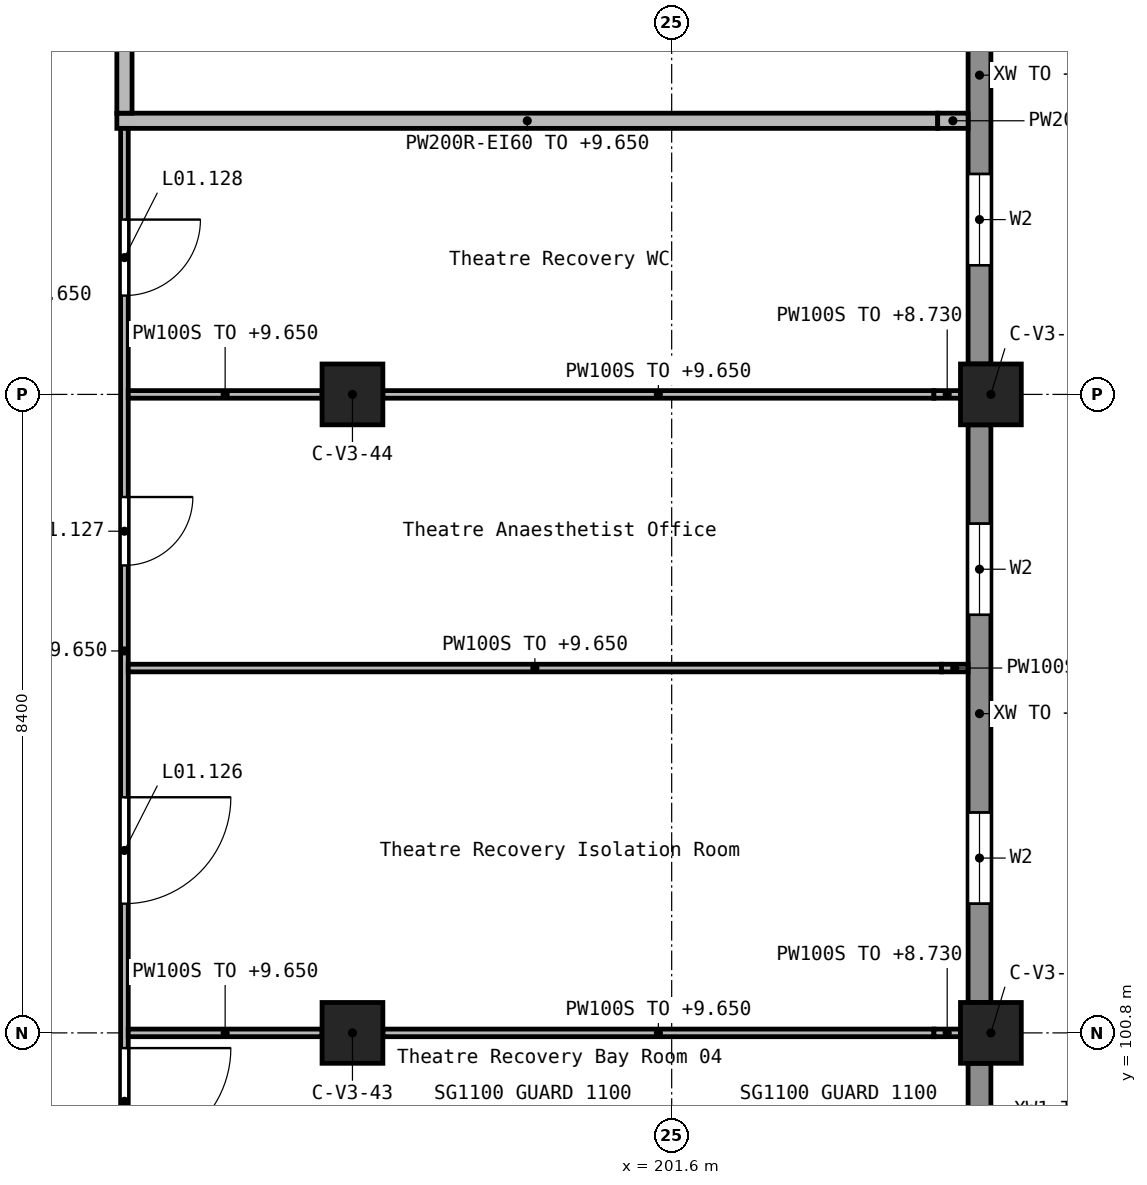
"""IFC4 building model, lengths in metres.
Left out: names, types, materials, properties, quantities, classifications, styles, units other than length and angle.
Written with IfcOpenShell. Run it as: python <this file> out.ifc"""

import sys

from ifc_helpers import new_model, si_unit, direction, frame, frame_2d, origin, origin_2d, place, context, subcontext, project, spatial, rectangle, extrude, element, fill, save


model = new_model("IFC4")
c1 = context("Model", 3, precision=1e-05, world=origin(), true_north=direction((0.0, 1.0)))
c2 = subcontext(c1, "Body", "Model", "MODEL_VIEW")
j1 = project(units=[si_unit("LENGTHUNIT", "METRE"), si_unit("PLANEANGLEUNIT", "RADIAN")], contexts=[c1])
p1 = place(None, origin())
s1 = spatial("IfcSite", under=j1, at=p1, CompositionType="ELEMENT")
p2 = place(p1, origin())
s2 = spatial("IfcBuilding", under=s1, at=p2, CompositionType="ELEMENT")
p3 = place(p2, frame((0.0, 0.0, 5.4)))
s3 = spatial("IfcBuildingStorey", under=s2, at=p3, CompositionType="ELEMENT", Elevation=5.4)
for number, where, z_axis, x_axis in (
    (1, (197.4, 100.8, 0.0), (0.0, 0.0, 1.0), (1.0, 0.0, 0.0)),
    (2, (197.4, 109.2, 0.0), (0.0, 0.0, 1.0), (1.0, 0.0, 0.0)),
    (3, (205.8, 100.8, 0.0), (0.0, 0.0, 1.0), (1.0, 0.0, 0.0)),
    (4, (205.8, 109.2, 0.0), (0.0, 0.0, 1.0), (1.0, 0.0, 0.0)),
):
    element("IfcColumn", number, at=place(p3, frame(where, z_axis=z_axis, x_axis=x_axis)), inside=s3, PredefinedType="COLUMN", context=c2, shape_type="SweptSolid", body=[
        extrude(rectangle(XDim=0.8, YDim=0.8, at=origin_2d()), origin(), (0.0, 0.0, 1.0), 4.5),
    ])
p4 = place(p3, frame((205.65, 99.175, 0.0), z_axis=(0.0, 0.0, 1.0), x_axis=(0.0, 1.0, 0.0)))
e5 = element("IfcWall", 5, at=p4, inside=s3, PredefinedType="STANDARD", context=c2, shape_type="SweptSolid", body=[
    extrude(rectangle(XDim=1.225, YDim=0.3, at=frame_2d((0.612, 0.0))), origin(), (0.0, 0.0, 1.0), 3.35),
])
p5 = place(p3, frame((205.65, 101.2, 0.0), z_axis=(0.0, 0.0, 1.0), x_axis=(0.0, 1.0, 0.0)))
e6 = element("IfcWall", 6, at=p5, inside=s3, PredefinedType="STANDARD", context=c2, shape_type="SweptSolid", body=[
    extrude(rectangle(XDim=7.6, YDim=0.3, at=frame_2d((3.8, 0.0))), origin(), (0.0, 0.0, 1.0), 3.35),
])
p6 = place(p5, frame((1.3, 0.0, 1.2)))
e7 = element("IfcOpeningElement", 7, at=p6, cuts=e6, PredefinedType="OPENING", context=c2, shape_type="SweptSolid", body=[
    extrude(rectangle(XDim=1.2, YDim=1.2, at=frame_2d((0.6, 0.6))), frame((0.0, 0.16, 0.0), z_axis=(0.0, -1.0, 0.0), x_axis=(1.0, 0.0, 0.0)), (0.0, 0.0, 1.0), 0.32),
])
p7 = place(p5, frame((5.1, 0.0, 1.2)))
e8 = element("IfcOpeningElement", 8, at=p7, cuts=e6, PredefinedType="OPENING", context=c2, shape_type="SweptSolid", body=[
    extrude(rectangle(XDim=1.2, YDim=1.2, at=frame_2d((0.6, 0.6))), frame((0.0, 0.16, 0.0), z_axis=(0.0, -1.0, 0.0), x_axis=(1.0, 0.0, 0.0)), (0.0, 0.0, 1.0), 0.32),
])
p8 = place(p3, frame((205.65, 109.6, 0.0), z_axis=(0.0, 0.0, 1.0), x_axis=(0.0, 1.0, 0.0)))
e9 = element("IfcWall", 9, at=p8, inside=s3, PredefinedType="STANDARD", context=c2, shape_type="SweptSolid", body=[
    extrude(rectangle(XDim=7.6, YDim=0.3, at=frame_2d((3.8, 0.0))), origin(), (0.0, 0.0, 1.0), 3.35),
])
p9 = place(p8, frame((1.3, 0.0, 1.2)))
e10 = element("IfcOpeningElement", 10, at=p9, cuts=e9, PredefinedType="OPENING", context=c2, shape_type="SweptSolid", body=[
    extrude(rectangle(XDim=1.2, YDim=1.2, at=frame_2d((0.6, 0.6))), frame((0.0, 0.16, 0.0), z_axis=(0.0, -1.0, 0.0), x_axis=(1.0, 0.0, 0.0)), (0.0, 0.0, 1.0), 0.32),
])
p10 = place(p8, frame((5.1, 0.0, 1.2)))
e11 = element("IfcOpeningElement", 11, at=p10, cuts=e9, PredefinedType="OPENING", context=c2, shape_type="SweptSolid", body=[
    extrude(rectangle(XDim=1.2, YDim=1.2, at=frame_2d((0.6, 0.6))), frame((0.0, 0.16, 0.0), z_axis=(0.0, -1.0, 0.0), x_axis=(1.0, 0.0, 0.0)), (0.0, 0.0, 1.0), 0.32),
])
p11 = place(p3, frame((194.3, 112.8, 0.0), z_axis=(0.0, 0.0, 1.0), x_axis=(1.0, 0.0, 0.0)))
e12 = element("IfcWall", 12, at=p11, inside=s3, PredefinedType="SOLIDWALL", context=c2, shape_type="SweptSolid", body=[
    extrude(rectangle(XDim=10.8, YDim=0.2, at=frame_2d((5.4, 0.0))), origin(), (0.0, 0.0, 1.0), 4.25),
])
p12 = place(p3, frame((205.1, 112.8, 0.0), z_axis=(0.0, 0.0, 1.0), x_axis=(1.0, 0.0, 0.0)))
e13 = element("IfcWall", 13, at=p12, inside=s3, PredefinedType="SOLIDWALL", context=c2, shape_type="SweptSolid", body=[
    extrude(rectangle(XDim=0.4, YDim=0.2, at=frame_2d((0.2, 0.0))), origin(), (0.0, 0.0, 1.0), 3.33),
])
p13 = place(p3, frame((194.4, 112.9, 0.0), z_axis=(0.0, 0.0, 1.0), x_axis=(0.0, 1.0, 0.0)))
e14 = element("IfcWall", 14, at=p13, inside=s3, PredefinedType="SOLIDWALL", context=c2, shape_type="SweptSolid", body=[
    extrude(rectangle(XDim=4.0, YDim=0.2, at=frame_2d((2.0, 0.0))), origin(), (0.0, 0.0, 1.0), 4.25),
])
p14 = place(p13, frame((1.8, 0.0, 0.0)))
e15 = element("IfcOpeningElement", 15, at=p14, cuts=e14, PredefinedType="OPENING", context=c2, shape_type="SweptSolid", body=[
    extrude(rectangle(XDim=1.0, YDim=2.1, at=frame_2d((0.5, 1.05))), frame((0.0, 0.11, 0.0), z_axis=(0.0, -1.0, 0.0), x_axis=(1.0, 0.0, 0.0)), (0.0, 0.0, 1.0), 0.22),
])
p15 = place(p3, frame((194.4, 112.7, 0.0), z_axis=(0.0, 0.0, 1.0), x_axis=(0.0, -1.0, 0.0)))
e16 = element("IfcWall", 16, at=p15, inside=s3, PredefinedType="PARTITIONING", context=c2, shape_type="SweptSolid", body=[
    extrude(rectangle(XDim=13.75, YDim=0.1, at=frame_2d((6.875, 0.0))), origin(), (0.0, 0.0, 1.0), 4.25),
])
p16 = place(p15, frame((12.1, 0.0, 0.0)))
e17 = element("IfcOpeningElement", 17, at=p16, cuts=e16, PredefinedType="OPENING", context=c2, shape_type="SweptSolid", body=[
    extrude(rectangle(XDim=1.4, YDim=2.1, at=frame_2d((0.7, 1.05))), frame((0.0, 0.06, 0.0), z_axis=(0.0, -1.0, 0.0), x_axis=(1.0, 0.0, 0.0)), (0.0, 0.0, 1.0), 0.12),
])
p17 = place(p15, frame((8.8, 0.0, 0.0)))
e18 = element("IfcOpeningElement", 18, at=p17, cuts=e16, PredefinedType="OPENING", context=c2, shape_type="SweptSolid", body=[
    extrude(rectangle(XDim=1.4, YDim=2.1, at=frame_2d((0.7, 1.05))), frame((0.0, 0.06, 0.0), z_axis=(0.0, -1.0, 0.0), x_axis=(1.0, 0.0, 0.0)), (0.0, 0.0, 1.0), 0.12),
])
p18 = place(p15, frame((4.85, 0.0, 0.0)))
e19 = element("IfcOpeningElement", 19, at=p18, cuts=e16, PredefinedType="OPENING", context=c2, shape_type="SweptSolid", body=[
    extrude(rectangle(XDim=0.9, YDim=2.1, at=frame_2d((0.45, 1.05))), frame((0.0, 0.06, 0.0), z_axis=(0.0, -1.0, 0.0), x_axis=(1.0, 0.0, 0.0)), (0.0, 0.0, 1.0), 0.12),
])
p19 = place(p15, frame((1.2, 0.0, 0.0)))
e20 = element("IfcOpeningElement", 20, at=p19, cuts=e16, PredefinedType="OPENING", context=c2, shape_type="SweptSolid", body=[
    extrude(rectangle(XDim=1.0, YDim=2.1, at=frame_2d((0.5, 1.05))), frame((0.0, 0.06, 0.0), z_axis=(0.0, -1.0, 0.0), x_axis=(1.0, 0.0, 0.0)), (0.0, 0.0, 1.0), 0.12),
])
p20 = place(p3, frame((194.45, 100.8, 0.0), z_axis=(0.0, 0.0, 1.0), x_axis=(1.0, 0.0, 0.0)))
e21 = element("IfcWall", 21, at=p20, inside=s3, PredefinedType="PARTITIONING", context=c2, shape_type="SweptSolid", body=[
    extrude(rectangle(XDim=2.55, YDim=0.1, at=frame_2d((1.275, 0.0))), origin(), (0.0, 0.0, 1.0), 4.25),
])
p21 = place(p3, frame((197.8, 100.8, 0.0), z_axis=(0.0, 0.0, 1.0), x_axis=(1.0, 0.0, 0.0)))
e22 = element("IfcWall", 22, at=p21, inside=s3, PredefinedType="PARTITIONING", context=c2, shape_type="SweptSolid", body=[
    extrude(rectangle(XDim=7.25, YDim=0.1, at=frame_2d((3.625, 0.0))), origin(), (0.0, 0.0, 1.0), 4.25),
])
p22 = place(p3, frame((205.05, 100.8, 0.0), z_axis=(0.0, 0.0, 1.0), x_axis=(1.0, 0.0, 0.0)))
e23 = element("IfcWall", 23, at=p22, inside=s3, PredefinedType="PARTITIONING", context=c2, shape_type="SweptSolid", body=[
    extrude(rectangle(XDim=0.35, YDim=0.1, at=frame_2d((0.175, 0.0))), origin(), (0.0, 0.0, 1.0), 3.33),
])
p23 = place(p3, frame((194.45, 105.6, 0.0), z_axis=(0.0, 0.0, 1.0), x_axis=(1.0, 0.0, 0.0)))
e24 = element("IfcWall", 24, at=p23, inside=s3, PredefinedType="PARTITIONING", context=c2, shape_type="SweptSolid", body=[
    extrude(rectangle(XDim=10.7, YDim=0.1, at=frame_2d((5.35, 0.0))), origin(), (0.0, 0.0, 1.0), 4.25),
])
p24 = place(p3, frame((205.15, 105.6, 0.0), z_axis=(0.0, 0.0, 1.0), x_axis=(1.0, 0.0, 0.0)))
e25 = element("IfcWall", 25, at=p24, inside=s3, PredefinedType="PARTITIONING", context=c2, shape_type="SweptSolid", body=[
    extrude(rectangle(XDim=0.35, YDim=0.1, at=frame_2d((0.175, 0.0))), origin(), (0.0, 0.0, 1.0), 3.33),
])
p25 = place(p3, frame((194.45, 109.2, 0.0), z_axis=(0.0, 0.0, 1.0), x_axis=(1.0, 0.0, 0.0)))
e26 = element("IfcWall", 26, at=p25, inside=s3, PredefinedType="PARTITIONING", context=c2, shape_type="SweptSolid", body=[
    extrude(rectangle(XDim=2.55, YDim=0.1, at=frame_2d((1.275, 0.0))), origin(), (0.0, 0.0, 1.0), 4.25),
])
p26 = place(p3, frame((197.8, 109.2, 0.0), z_axis=(0.0, 0.0, 1.0), x_axis=(1.0, 0.0, 0.0)))
e27 = element("IfcWall", 27, at=p26, inside=s3, PredefinedType="PARTITIONING", context=c2, shape_type="SweptSolid", body=[
    extrude(rectangle(XDim=7.25, YDim=0.1, at=frame_2d((3.625, 0.0))), origin(), (0.0, 0.0, 1.0), 4.25),
])
p27 = place(p3, frame((205.05, 109.2, 0.0), z_axis=(0.0, 0.0, 1.0), x_axis=(1.0, 0.0, 0.0)))
e28 = element("IfcWall", 28, at=p27, inside=s3, PredefinedType="PARTITIONING", context=c2, shape_type="SweptSolid", body=[
    extrude(rectangle(XDim=0.35, YDim=0.1, at=frame_2d((0.175, 0.0))), origin(), (0.0, 0.0, 1.0), 3.33),
])
p28 = place(p6, origin())
e29 = element("IfcWindow", 29, at=p28, inside=s3, PartitioningType="SINGLE_PANEL", PredefinedType="WINDOW", context=c2, shape_type="SweptSolid", body=[
    extrude(rectangle(XDim=1.2, YDim=1.2, at=frame_2d((0.6, 0.6))), frame((0.0, 0.03, 0.0), z_axis=(0.0, -1.0, 0.0), x_axis=(1.0, 0.0, 0.0)), (0.0, 0.0, 1.0), 0.06),
])
fill(e7, e29)
p29 = place(p7, origin())
e30 = element("IfcWindow", 30, at=p29, inside=s3, PartitioningType="SINGLE_PANEL", PredefinedType="WINDOW", context=c2, shape_type="SweptSolid", body=[
    extrude(rectangle(XDim=1.2, YDim=1.2, at=frame_2d((0.6, 0.6))), frame((0.0, 0.03, 0.0), z_axis=(0.0, -1.0, 0.0), x_axis=(1.0, 0.0, 0.0)), (0.0, 0.0, 1.0), 0.06),
])
fill(e8, e30)
p30 = place(p9, origin())
e31 = element("IfcWindow", 31, at=p30, inside=s3, PartitioningType="SINGLE_PANEL", PredefinedType="WINDOW", context=c2, shape_type="SweptSolid", body=[
    extrude(rectangle(XDim=1.2, YDim=1.2, at=frame_2d((0.6, 0.6))), frame((0.0, 0.03, 0.0), z_axis=(0.0, -1.0, 0.0), x_axis=(1.0, 0.0, 0.0)), (0.0, 0.0, 1.0), 0.06),
])
fill(e10, e31)
p31 = place(p16, origin())
e32 = element("IfcDoor", 32, at=p31, inside=s3, OperationType="DOUBLE_DOOR_SINGLE_SWING", PredefinedType="DOOR", context=c2, shape_type="SweptSolid", body=[
    extrude(rectangle(XDim=1.4, YDim=2.1, at=frame_2d((0.7, 1.05))), frame((0.0, 0.025, 0.0), z_axis=(0.0, -1.0, 0.0), x_axis=(1.0, 0.0, 0.0)), (0.0, 0.0, 1.0), 0.05),
])
fill(e17, e32)
p32 = place(p17, origin())
e33 = element("IfcDoor", 33, at=p32, inside=s3, OperationType="DOUBLE_DOOR_SINGLE_SWING", PredefinedType="DOOR", context=c2, shape_type="SweptSolid", body=[
    extrude(rectangle(XDim=1.4, YDim=2.1, at=frame_2d((0.7, 1.05))), frame((0.0, 0.025, 0.0), z_axis=(0.0, -1.0, 0.0), x_axis=(1.0, 0.0, 0.0)), (0.0, 0.0, 1.0), 0.05),
])
fill(e18, e33)
p33 = place(p18, origin())
e34 = element("IfcDoor", 34, at=p33, inside=s3, OperationType="SINGLE_SWING_LEFT", PredefinedType="DOOR", context=c2, shape_type="SweptSolid", body=[
    extrude(rectangle(XDim=0.9, YDim=2.1, at=frame_2d((0.45, 1.05))), frame((0.0, 0.025, 0.0), z_axis=(0.0, -1.0, 0.0), x_axis=(1.0, 0.0, 0.0)), (0.0, 0.0, 1.0), 0.05),
])
fill(e19, e34)
p34 = place(p19, origin())
e35 = element("IfcDoor", 35, at=p34, inside=s3, OperationType="SINGLE_SWING_LEFT", PredefinedType="DOOR", context=c2, shape_type="SweptSolid", body=[
    extrude(rectangle(XDim=1.0, YDim=2.1, at=frame_2d((0.5, 1.05))), frame((0.0, 0.025, 0.0), z_axis=(0.0, -1.0, 0.0), x_axis=(1.0, 0.0, 0.0)), (0.0, 0.0, 1.0), 0.05),
])
fill(e20, e35)
save(model, sys.argv[1])
